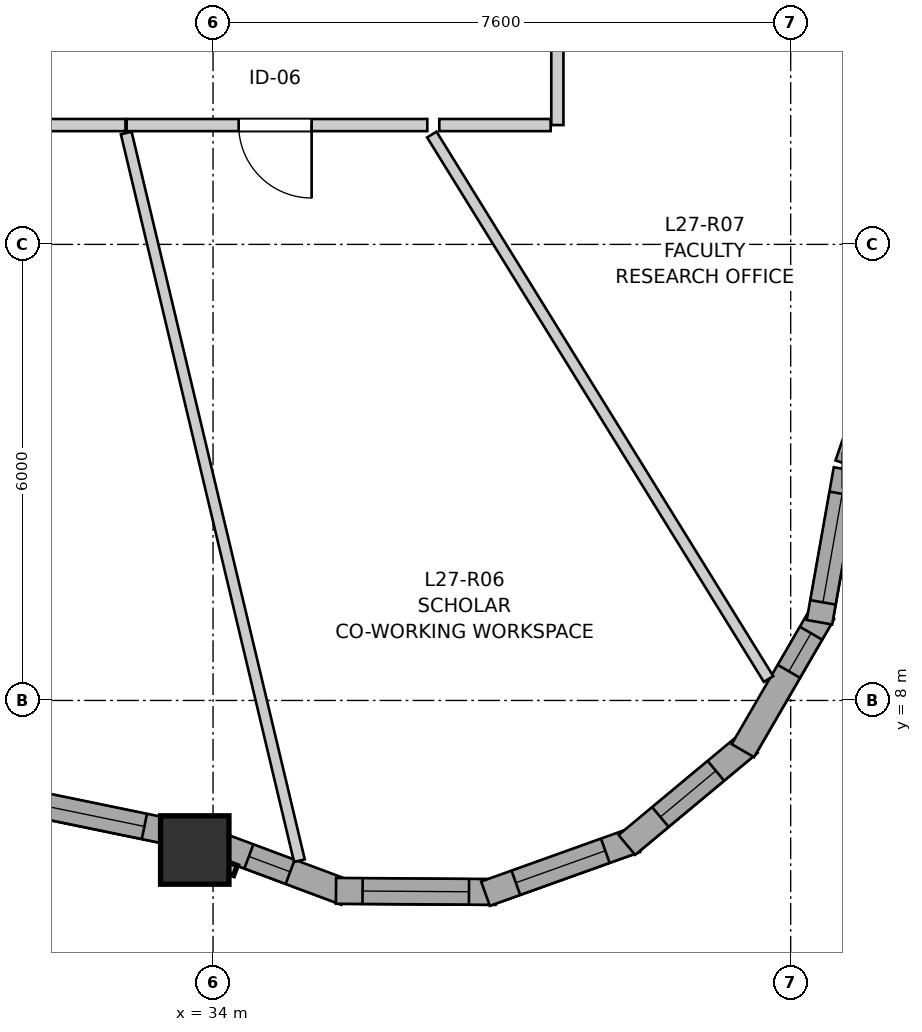
"""IFC4 building model, lengths in metres.
Left out: names, types, materials, properties, quantities, classifications, styles, units other than length and angle.
Written with IfcOpenShell. Run it as: python <this file> out.ifc"""

import sys

from ifc_helpers import new_model, si_unit, direction, frame, frame_2d, origin, origin_2d, place, context, subcontext, project, spatial, rectangle, extrude, source, transform, mapped, element, fill, save


model = new_model("IFC4")
c1 = context("Model", 3, precision=1e-05, world=origin(), true_north=direction((0.0, 1.0)))
c2 = subcontext(c1, "Body", "Model", "MODEL_VIEW")
j1 = project(units=[si_unit("LENGTHUNIT", "METRE"), si_unit("PLANEANGLEUNIT", "RADIAN")], contexts=[c1])
p1 = place(None, origin())
s1 = spatial("IfcSite", under=j1, at=p1, CompositionType="ELEMENT")
p2 = place(p1, origin())
s2 = spatial("IfcBuilding", under=s1, at=p2, CompositionType="ELEMENT")
p3 = place(p2, frame((0.0, 0.0, 92.8)))
s3 = spatial("IfcBuildingStorey", under=s2, at=p3, CompositionType="ELEMENT", Elevation=92.8)
m1 = source(origin(), c2, "Body", "SweptSolid", [
    extrude(rectangle(XDim=0.9, YDim=0.9, at=origin_2d()), origin(), (0.0, 0.0, 1.0), 2.95),
])
p4 = place(p3, frame((33.76, 6.032, 0.0), z_axis=(0.0, 0.0, 1.0), x_axis=(1.0, 0.0, 0.0)))
e1 = element("IfcColumn", 1, at=p4, inside=s3, PredefinedType="COLUMN", context=c2, shape_type="MappedRepresentation", body=[
    mapped(m1, transform((0.0, 0.0, 0.0), x_axis=(1.0, 0.0, 0.0), y_axis=(0.0, 1.0, 0.0), z_axis=(0.0, 0.0, 1.0), scale=1.0)),
])
p5 = place(p3, frame((30.705, 6.835, 0.0), z_axis=(0.0, 0.0, 1.0), x_axis=(0.979433750273, -0.201766024954, 0.0)))
e2 = element("IfcWall", 2, at=p5, inside=s3, PredefinedType="SOLIDWALL", context=c2, shape_type="SweptSolid", body=[
    extrude(rectangle(XDim=2.923, YDim=0.34, at=frame_2d((1.462, 0.0))), origin(), (0.0, 0.0, 1.0), 2.48),
])
p6 = place(p5, frame((0.492, 0.0, 0.82)))
e3 = element("IfcOpeningElement", 3, at=p6, cuts=e2, PredefinedType="OPENING", context=c2, shape_type="SweptSolid", body=[
    extrude(rectangle(XDim=1.95, YDim=1.4, at=frame_2d((0.975, 0.7))), frame((0.0, 0.18, 0.0), z_axis=(0.0, -1.0, 0.0), x_axis=(1.0, 0.0, 0.0)), (0.0, 0.0, 1.0), 0.36),
])
p7 = place(p3, frame((34.034, 6.111, 0.0), z_axis=(0.0, 0.0, 1.0), x_axis=(0.936815884802, -0.349822809409, 0.0)))
e4 = element("IfcWall", 4, at=p7, inside=s3, PredefinedType="SOLIDWALL", context=c2, shape_type="SweptSolid", body=[
    extrude(rectangle(XDim=1.831, YDim=0.34, at=frame_2d((0.916, 0.0))), origin(), (0.0, 0.0, 1.0), 2.48),
])
p8 = place(p7, frame((0.466, 0.0, 0.82)))
e5 = element("IfcOpeningElement", 5, at=p8, cuts=e4, PredefinedType="OPENING", context=c2, shape_type="SweptSolid", body=[
    extrude(rectangle(XDim=0.58, YDim=1.35, at=frame_2d((0.29, 0.675))), frame((0.0, 0.18, 0.0), z_axis=(0.0, -1.0, 0.0), x_axis=(1.0, 0.0, 0.0)), (0.0, 0.0, 1.0), 0.36),
])
p9 = place(p3, frame((35.618, 5.495, 0.0), z_axis=(0.0, 0.0, 1.0), x_axis=(0.999976451414, -0.006862697526, 0.0)))
e6 = element("IfcWall", 6, at=p9, inside=s3, PredefinedType="SOLIDWALL", context=c2, shape_type="SweptSolid", body=[
    extrude(rectangle(XDim=2.099, YDim=0.34, at=frame_2d((1.049, 0.0))), origin(), (0.0, 0.0, 1.0), 2.48),
])
p10 = place(p9, frame((0.35, 0.0, 0.82)))
e7 = element("IfcOpeningElement", 7, at=p10, cuts=e6, PredefinedType="OPENING", context=c2, shape_type="SweptSolid", body=[
    extrude(rectangle(XDim=1.4, YDim=1.35, at=frame_2d((0.7, 0.675))), frame((0.0, 0.18, 0.0), z_axis=(0.0, -1.0, 0.0), x_axis=(1.0, 0.0, 0.0)), (0.0, 0.0, 1.0), 0.36),
])
p11 = place(p3, frame((37.584, 5.458, 0.0), z_axis=(0.0, 0.0, 1.0), x_axis=(0.941473186867, 0.33708787936, 0.0)))
e8 = element("IfcWall", 8, at=p11, inside=s3, PredefinedType="SOLIDWALL", context=c2, shape_type="SweptSolid", body=[
    extrude(rectangle(XDim=2.099, YDim=0.34, at=frame_2d((1.049, 0.0))), origin(), (0.0, 0.0, 1.0), 2.48),
])
p12 = place(p11, frame((0.425, 0.0, 0.82)))
e9 = element("IfcOpeningElement", 9, at=p12, cuts=e8, PredefinedType="OPENING", context=c2, shape_type="SweptSolid", body=[
    extrude(rectangle(XDim=1.25, YDim=1.35, at=frame_2d((0.625, 0.675))), frame((0.0, 0.18, 0.0), z_axis=(0.0, -1.0, 0.0), x_axis=(1.0, 0.0, 0.0)), (0.0, 0.0, 1.0), 0.36),
])
p13 = place(p3, frame((39.444, 6.099, 0.0), z_axis=(0.0, 0.0, 1.0), x_axis=(0.768497696041, 0.639852554249, 0.0)))
e10 = element("IfcWall", 10, at=p13, inside=s3, PredefinedType="SOLIDWALL", context=c2, shape_type="SweptSolid", body=[
    extrude(rectangle(XDim=2.099, YDim=0.34, at=frame_2d((1.049, 0.0))), origin(), (0.0, 0.0, 1.0), 2.48),
])
p14 = place(p13, frame((0.574, 0.0, 0.82)))
e11 = element("IfcOpeningElement", 11, at=p14, cuts=e10, PredefinedType="OPENING", context=c2, shape_type="SweptSolid", body=[
    extrude(rectangle(XDim=0.95, YDim=1.35, at=frame_2d((0.475, 0.675))), frame((0.0, 0.18, 0.0), z_axis=(0.0, -1.0, 0.0), x_axis=(1.0, 0.0, 0.0)), (0.0, 0.0, 1.0), 0.36),
])
p15 = place(p3, frame((40.971, 7.34, 0.0), z_axis=(0.0, 0.0, 1.0), x_axis=(0.501902596059, 0.864924149315, 0.0)))
e12 = element("IfcWall", 12, at=p15, inside=s3, PredefinedType="SOLIDWALL", context=c2, shape_type="SweptSolid", body=[
    extrude(rectangle(XDim=2.099, YDim=0.34, at=frame_2d((1.049, 0.0))), origin(), (0.0, 0.0, 1.0), 2.48),
])
p16 = place(p15, frame((1.206, 0.0, 0.82)))
e13 = element("IfcOpeningElement", 13, at=p16, cuts=e12, PredefinedType="OPENING", context=c2, shape_type="SweptSolid", body=[
    extrude(rectangle(XDim=0.58, YDim=1.35, at=frame_2d((0.29, 0.675))), frame((0.0, 0.18, 0.0), z_axis=(0.0, -1.0, 0.0), x_axis=(1.0, 0.0, 0.0)), (0.0, 0.0, 1.0), 0.36),
])
p17 = place(p3, frame((41.978, 9.029, 0.0), z_axis=(0.0, 0.0, 1.0), x_axis=(0.174283452483, 0.984695525627, 0.0)))
e14 = element("IfcWall", 14, at=p17, inside=s3, PredefinedType="SOLIDWALL", context=c2, shape_type="SweptSolid", body=[
    extrude(rectangle(XDim=2.041, YDim=0.34, at=frame_2d((1.021, 0.0))), origin(), (0.0, 0.0, 1.0), 2.48),
])
p18 = place(p17, frame((0.265, 0.0, 0.82)))
e15 = element("IfcOpeningElement", 15, at=p18, cuts=e14, PredefinedType="OPENING", context=c2, shape_type="SweptSolid", body=[
    extrude(rectangle(XDim=1.45, YDim=1.25, at=frame_2d((0.725, 0.625))), frame((0.0, 0.18, 0.0), z_axis=(0.0, -1.0, 0.0), x_axis=(1.0, 0.0, 0.0)), (0.0, 0.0, 1.0), 0.36),
])
p19 = place(p3, frame((42.351, 11.103, 0.0), z_axis=(0.0, 0.0, 1.0), x_axis=(0.323582854182, 0.946199839611, 0.0)))
e16 = element("IfcWall", 16, at=p19, inside=s3, PredefinedType="SOLIDWALL", context=c2, shape_type="SweptSolid", body=[
    extrude(rectangle(XDim=3.182, YDim=0.34, at=frame_2d((1.591, 0.0))), origin(), (0.0, 0.0, 1.0), 2.48),
])
p20 = place(p19, frame((0.856, 0.0, 0.82)))
e17 = element("IfcOpeningElement", 17, at=p20, cuts=e16, PredefinedType="OPENING", context=c2, shape_type="SweptSolid", body=[
    extrude(rectangle(XDim=1.45, YDim=1.25, at=frame_2d((0.725, 0.625))), frame((0.0, 0.18, 0.0), z_axis=(0.0, -1.0, 0.0), x_axis=(1.0, 0.0, 0.0)), (0.0, 0.0, 1.0), 0.36),
])
p21 = place(p3, frame((38.53, 21.281, 0.0), z_axis=(0.0, 0.0, 1.0), x_axis=(0.0, -1.0, 0.0)))
e18 = element("IfcWall", 18, at=p21, inside=s3, PredefinedType="PARTITIONING", context=c2, shape_type="SweptSolid", body=[
    extrude(rectangle(XDim=5.711, YDim=0.16, at=frame_2d((2.855, 0.0))), origin(), (0.0, 0.0, 1.0), 2.95),
])
p22 = place(p21, frame((2.384, 0.0, 0.0)))
e19 = element("IfcOpeningElement", 19, at=p22, cuts=e18, PredefinedType="OPENING", context=c2, shape_type="SweptSolid", body=[
    extrude(rectangle(XDim=0.96, YDim=2.1, at=frame_2d((0.48, 1.05))), frame((0.0, 0.09, 0.0), z_axis=(0.0, -1.0, 0.0), x_axis=(1.0, 0.0, 0.0)), (0.0, 0.0, 1.0), 0.18),
])
p23 = place(p3, frame((32.848, 15.57, 0.0), z_axis=(0.0, 0.0, 1.0), x_axis=(-1.0, 0.0, 0.0)))
e20 = element("IfcWall", 20, at=p23, inside=s3, PredefinedType="PARTITIONING", context=c2, shape_type="SweptSolid", body=[
    extrude(rectangle(XDim=5.621, YDim=0.16, at=frame_2d((2.811, 0.0))), origin(), (0.0, 0.0, 1.0), 2.95),
])
p24 = place(p23, frame((2.16, 0.0, 0.0)))
e21 = element("IfcOpeningElement", 21, at=p24, cuts=e20, PredefinedType="OPENING", context=c2, shape_type="SweptSolid", body=[
    extrude(rectangle(XDim=1.3, YDim=2.1, at=frame_2d((0.65, 1.05))), frame((0.0, 0.09, 0.0), z_axis=(0.0, -1.0, 0.0), x_axis=(1.0, 0.0, 0.0)), (0.0, 0.0, 1.0), 0.18),
])
p25 = place(p3, frame((36.819, 15.57, 0.0), z_axis=(0.0, 0.0, 1.0), x_axis=(-1.0, 0.0, 0.0)))
e22 = element("IfcWall", 22, at=p25, inside=s3, PredefinedType="PARTITIONING", context=c2, shape_type="SweptSolid", body=[
    extrude(rectangle(XDim=3.956, YDim=0.16, at=frame_2d((1.978, 0.0))), origin(), (0.0, 0.0, 1.0), 2.95),
])
p26 = place(p25, frame((1.522, 0.0, 0.0)))
e23 = element("IfcOpeningElement", 23, at=p26, cuts=e22, PredefinedType="OPENING", context=c2, shape_type="SweptSolid", body=[
    extrude(rectangle(XDim=0.96, YDim=2.1, at=frame_2d((0.48, 1.05))), frame((0.0, 0.09, 0.0), z_axis=(0.0, -1.0, 0.0), x_axis=(1.0, 0.0, 0.0)), (0.0, 0.0, 1.0), 0.18),
])
p27 = place(p3, frame((32.858, 15.465, 0.0), z_axis=(0.0, 0.0, 1.0), x_axis=(0.231516552249, -0.97283096478, 0.0)))
e24 = element("IfcWall", 24, at=p27, inside=s3, PredefinedType="PARTITIONING", context=c2, shape_type="SweptSolid", body=[
    extrude(rectangle(XDim=9.841, YDim=0.145, at=frame_2d((4.92, 0.0))), origin(), (0.0, 0.0, 1.0), 2.95),
])
p28 = place(p3, frame((36.878, 15.445, 0.0), z_axis=(0.0, 0.0, 1.0), x_axis=(0.526001305793, -0.850483760165, 0.0)))
e25 = element("IfcWall", 25, at=p28, inside=s3, PredefinedType="PARTITIONING", context=c2, shape_type="SweptSolid", body=[
    extrude(rectangle(XDim=8.422, YDim=0.145, at=frame_2d((4.211, 0.0))), origin(), (0.0, 0.0, 1.0), 2.95),
])
p29 = place(p3, frame((36.977, 15.57, 0.0), z_axis=(0.0, 0.0, 1.0), x_axis=(1.0, 0.0, 0.0)))
e26 = element("IfcWall", 26, at=p29, inside=s3, PredefinedType="PARTITIONING", context=c2, shape_type="SweptSolid", body=[
    extrude(rectangle(XDim=1.465, YDim=0.16, at=frame_2d((0.732, 0.0))), origin(), (0.0, 0.0, 1.0), 2.95),
])
m2 = source(origin(), c2, "Body", "SweptSolid", [
    extrude(rectangle(XDim=1.95, YDim=1.4, at=frame_2d((0.975, 0.7))), frame((0.0, 0.03, 0.0), z_axis=(0.0, -1.0, 0.0), x_axis=(1.0, 0.0, 0.0)), (0.0, 0.0, 1.0), 0.06),
])
p30 = place(p6, origin())
e27 = element("IfcWindow", 27, at=p30, inside=s3, PartitioningType="SINGLE_PANEL", PredefinedType="WINDOW", context=c2, shape_type="MappedRepresentation", body=[
    mapped(m2, transform((0.0, 0.0, 0.0), x_axis=(1.0, 0.0, 0.0), y_axis=(0.0, 1.0, 0.0), z_axis=(0.0, 0.0, 1.0), scale=1.0)),
])
fill(e3, e27)
m3 = source(origin(), c2, "Body", "SweptSolid", [
    extrude(rectangle(XDim=0.58, YDim=1.35, at=frame_2d((0.29, 0.675))), frame((0.0, 0.03, 0.0), z_axis=(0.0, -1.0, 0.0), x_axis=(1.0, 0.0, 0.0)), (0.0, 0.0, 1.0), 0.06),
])
p31 = place(p8, origin())
e28 = element("IfcWindow", 28, at=p31, inside=s3, PartitioningType="SINGLE_PANEL", PredefinedType="WINDOW", context=c2, shape_type="MappedRepresentation", body=[
    mapped(m3, transform((0.0, 0.0, 0.0), x_axis=(1.0, 0.0, 0.0), y_axis=(0.0, 1.0, 0.0), z_axis=(0.0, 0.0, 1.0), scale=1.0)),
])
fill(e5, e28)
m4 = source(origin(), c2, "Body", "SweptSolid", [
    extrude(rectangle(XDim=1.4, YDim=1.35, at=frame_2d((0.7, 0.675))), frame((0.0, 0.03, 0.0), z_axis=(0.0, -1.0, 0.0), x_axis=(1.0, 0.0, 0.0)), (0.0, 0.0, 1.0), 0.06),
])
p32 = place(p10, origin())
e29 = element("IfcWindow", 29, at=p32, inside=s3, PartitioningType="SINGLE_PANEL", PredefinedType="WINDOW", context=c2, shape_type="MappedRepresentation", body=[
    mapped(m4, transform((0.0, 0.0, 0.0), x_axis=(1.0, 0.0, 0.0), y_axis=(0.0, 1.0, 0.0), z_axis=(0.0, 0.0, 1.0), scale=1.0)),
])
fill(e7, e29)
m5 = source(origin(), c2, "Body", "SweptSolid", [
    extrude(rectangle(XDim=1.25, YDim=1.35, at=frame_2d((0.625, 0.675))), frame((0.0, 0.03, 0.0), z_axis=(0.0, -1.0, 0.0), x_axis=(1.0, 0.0, 0.0)), (0.0, 0.0, 1.0), 0.06),
])
p33 = place(p12, origin())
e30 = element("IfcWindow", 30, at=p33, inside=s3, PartitioningType="SINGLE_PANEL", PredefinedType="WINDOW", context=c2, shape_type="MappedRepresentation", body=[
    mapped(m5, transform((0.0, 0.0, 0.0), x_axis=(1.0, 0.0, 0.0), y_axis=(0.0, 1.0, 0.0), z_axis=(0.0, 0.0, 1.0), scale=1.0)),
])
fill(e9, e30)
m6 = source(origin(), c2, "Body", "SweptSolid", [
    extrude(rectangle(XDim=0.95, YDim=1.35, at=frame_2d((0.475, 0.675))), frame((0.0, 0.03, 0.0), z_axis=(0.0, -1.0, 0.0), x_axis=(1.0, 0.0, 0.0)), (0.0, 0.0, 1.0), 0.06),
])
p34 = place(p14, origin())
e31 = element("IfcWindow", 31, at=p34, inside=s3, PartitioningType="SINGLE_PANEL", PredefinedType="WINDOW", context=c2, shape_type="MappedRepresentation", body=[
    mapped(m6, transform((0.0, 0.0, 0.0), x_axis=(1.0, 0.0, 0.0), y_axis=(0.0, 1.0, 0.0), z_axis=(0.0, 0.0, 1.0), scale=1.0)),
])
fill(e11, e31)
p35 = place(p16, origin())
e32 = element("IfcWindow", 32, at=p35, inside=s3, PartitioningType="SINGLE_PANEL", PredefinedType="WINDOW", context=c2, shape_type="MappedRepresentation", body=[
    mapped(m3, transform((0.0, 0.0, 0.0), x_axis=(1.0, 0.0, 0.0), y_axis=(0.0, 1.0, 0.0), z_axis=(0.0, 0.0, 1.0), scale=1.0)),
])
fill(e13, e32)
m7 = source(origin(), c2, "Body", "SweptSolid", [
    extrude(rectangle(XDim=1.45, YDim=1.25, at=frame_2d((0.725, 0.625))), frame((0.0, 0.03, 0.0), z_axis=(0.0, -1.0, 0.0), x_axis=(1.0, 0.0, 0.0)), (0.0, 0.0, 1.0), 0.06),
])
p36 = place(p18, origin())
e33 = element("IfcWindow", 33, at=p36, inside=s3, PartitioningType="SINGLE_PANEL", PredefinedType="WINDOW", context=c2, shape_type="MappedRepresentation", body=[
    mapped(m7, transform((0.0, 0.0, 0.0), x_axis=(1.0, 0.0, 0.0), y_axis=(0.0, 1.0, 0.0), z_axis=(0.0, 0.0, 1.0), scale=1.0)),
])
fill(e15, e33)
m8 = source(origin(), c2, "Body", "SweptSolid", [
    extrude(rectangle(XDim=0.96, YDim=2.1, at=frame_2d((0.48, 1.05))), frame((0.0, 0.025, 0.0), z_axis=(0.0, -1.0, 0.0), x_axis=(1.0, 0.0, 0.0)), (0.0, 0.0, 1.0), 0.05),
])
p37 = place(p26, origin())
e34 = element("IfcDoor", 34, at=p37, inside=s3, OperationType="SINGLE_SWING_LEFT", PredefinedType="DOOR", context=c2, shape_type="MappedRepresentation", body=[
    mapped(m8, transform((0.0, 0.0, 0.0), x_axis=(1.0, 0.0, 0.0), y_axis=(0.0, 1.0, 0.0), z_axis=(0.0, 0.0, 1.0), scale=1.0)),
])
fill(e23, e34)
save(model, sys.argv[1])
